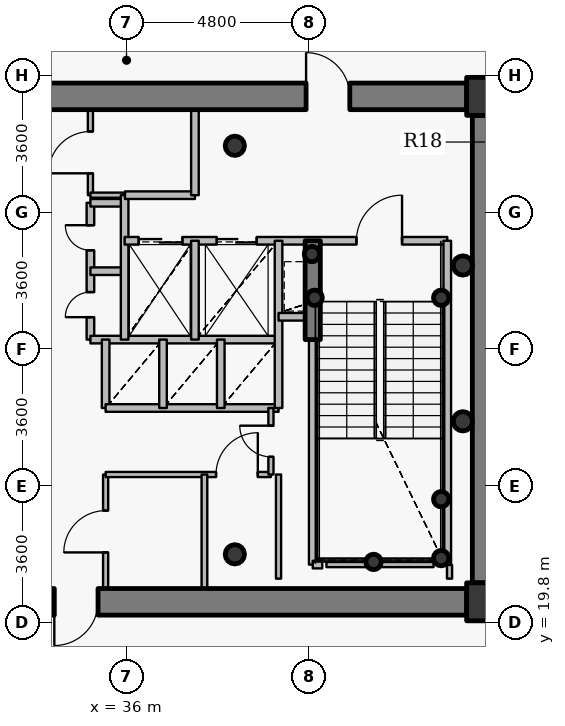
"""IFC4 building model, lengths in metres.
Left out: names, types, materials, properties, quantities, classifications, styles, units other than length and angle.
Written with IfcOpenShell. Run it as: python <this file> out.ifc"""

import sys

from ifc_helpers import new_model, si_unit, direction, frame, frame_2d, origin, origin_2d, place, context, subcontext, project, spatial, rectangle, hollow_circle, extrude, source, transform, mapped, element, fill, save


model = new_model("IFC4")
c1 = context("Model", 3, precision=1e-05, world=origin(), true_north=direction((0.0, 1.0)))
c2 = subcontext(c1, "Body", "Model", "MODEL_VIEW")
j1 = project(units=[si_unit("LENGTHUNIT", "METRE"), si_unit("PLANEANGLEUNIT", "RADIAN")], contexts=[c1])
p1 = place(None, origin())
s1 = spatial("IfcSite", under=j1, at=p1, CompositionType="ELEMENT")
p2 = place(p1, origin())
s2 = spatial("IfcBuilding", under=s1, at=p2, CompositionType="ELEMENT")
p3 = place(p2, frame((0.0, 0.0, 259.05)))
s3 = spatial("IfcBuildingStorey", under=s2, at=p3, CompositionType="ELEMENT", Elevation=259.05)
for number, where, z_axis, x_axis in (
    (1, (45.45, 20.35, 0.0), (0.0, 0.0, 1.0), (1.0, 0.0, 0.0)),
    (2, (45.45, 33.65, 0.0), (0.0, 0.0, 1.0), (1.0, 0.0, 0.0)),
):
    element("IfcColumn", number, at=place(p3, frame(where, z_axis=z_axis, x_axis=x_axis)), inside=s3, PredefinedType="COLUMN", context=c2, shape_type="SweptSolid", body=[
        extrude(rectangle(XDim=1.0, YDim=1.0, at=origin_2d()), origin(), (0.0, 0.0, 1.0), 3.75),
    ])
for number, where, z_axis, x_axis in (
    (3, (38.85, 21.6, 0.0), (0.0, 0.0, 1.0), (1.0, 0.0, 0.0)),
    (4, (38.85, 32.35, 0.0), (0.0, 0.0, 1.0), (1.0, 0.0, 0.0)),
):
    element("IfcColumn", number, at=place(p3, frame(where, z_axis=z_axis, x_axis=x_axis)), inside=s3, PredefinedType="COLUMN", context=c2, shape_type="SweptSolid", body=[
        extrude(hollow_circle(Radius=0.254, WallThickness=0.02, at=origin_2d()), origin(), (0.0, 0.0, 1.0), 3.75),
    ])
for number, where, z_axis, x_axis in (
    (5, (44.28, 21.5, 0.0), (0.0, 0.0, 1.0), (1.0, 0.0, 0.0)),
    (6, (44.28, 23.05, 0.0), (0.0, 0.0, 1.0), (1.0, 0.0, 0.0)),
    (7, (42.5, 21.4, 0.0), (0.0, 0.0, 1.0), (1.0, 0.0, 0.0)),
    (8, (40.95, 28.35, 0.0), (0.0, 0.0, 1.0), (1.0, 0.0, 0.0)),
    (9, (44.28, 28.35, 0.0), (0.0, 0.0, 1.0), (1.0, 0.0, 0.0)),
    (10, (40.88, 29.5, 0.0), (0.0, 0.0, 1.0), (1.0, 0.0, 0.0)),
):
    element("IfcColumn", number, at=place(p3, frame(where, z_axis=z_axis, x_axis=x_axis)), inside=s3, PredefinedType="COLUMN", context=c2, shape_type="SweptSolid", body=[
        extrude(hollow_circle(Radius=0.203, WallThickness=0.016, at=origin_2d()), origin(), (0.0, 0.0, 1.0), 3.75),
    ])
p4 = place(p3, frame((27.05, 33.65, 0.0), z_axis=(0.0, 0.0, 1.0), x_axis=(1.0, 0.0, 0.0)))
e11 = element("IfcWall", 11, at=p4, inside=s3, PredefinedType="SHEAR", context=c2, shape_type="SweptSolid", body=[
    extrude(rectangle(XDim=17.9, YDim=0.7, at=frame_2d((8.95, 0.0))), origin(), (0.0, 0.0, 1.0), 3.0),
])
p5 = place(p4, frame((13.675, 0.0, 0.0)))
e12 = element("IfcOpeningElement", 12, at=p5, cuts=e11, PredefinedType="OPENING", context=c2, shape_type="SweptSolid", body=[
    extrude(rectangle(XDim=1.15, YDim=2.15, at=origin_2d()), frame((0.575, 0.36, 1.075), z_axis=(0.0, -1.0, 0.0), x_axis=(1.0, 0.0, 0.0)), (0.0, 0.0, 1.0), 0.72),
])
p6 = place(p3, frame((45.45, 33.15, 0.0), z_axis=(0.0, 0.0, 1.0), x_axis=(0.0, -1.0, 0.0)))
e13 = element("IfcWall", 13, at=p6, inside=s3, PredefinedType="SHEAR", context=c2, shape_type="SweptSolid", body=[
    extrude(rectangle(XDim=12.3, YDim=0.7, at=frame_2d((6.15, 0.0))), origin(), (0.0, 0.0, 1.0), 3.0),
])
p7 = place(p3, frame((44.95, 20.35, 0.0), z_axis=(0.0, 0.0, 1.0), x_axis=(-1.0, 0.0, 0.0)))
e14 = element("IfcWall", 14, at=p7, inside=s3, PredefinedType="SHEAR", context=c2, shape_type="SweptSolid", body=[
    extrude(rectangle(XDim=17.9, YDim=0.7, at=frame_2d((8.95, 0.0))), origin(), (0.0, 0.0, 1.0), 3.0),
])
p8 = place(p7, frame((9.7, 0.0, 0.0)))
e15 = element("IfcOpeningElement", 15, at=p8, cuts=e14, PredefinedType="OPENING", context=c2, shape_type="SweptSolid", body=[
    extrude(rectangle(XDim=1.15, YDim=2.15, at=origin_2d()), frame((0.575, 0.36, 1.075), z_axis=(0.0, -1.0, 0.0), x_axis=(1.0, 0.0, 0.0)), (0.0, 0.0, 1.0), 0.72),
])
p9 = place(p3, frame((40.9, 27.25, 0.0), z_axis=(0.0, 0.0, 1.0), x_axis=(0.0, 1.0, 0.0)))
e16 = element("IfcWall", 16, at=p9, inside=s3, PredefinedType="SHEAR", context=c2, shape_type="SweptSolid", body=[
    extrude(rectangle(XDim=2.6, YDim=0.4, at=frame_2d((1.3, 0.0))), origin(), (0.0, 0.0, 1.0), 3.05),
])
for number, where, z_axis, x_axis in (
    (17, (44.85, 25.1, 0.0), (0.0, 0.0, 1.0), (1.0, 0.0, 0.0)),
    (18, (44.85, 29.2, 0.0), (0.0, 0.0, 1.0), (1.0, 0.0, 0.0)),
):
    element("IfcColumn", number, at=place(p3, frame(where, z_axis=z_axis, x_axis=x_axis)), inside=s3, PredefinedType="COLUMN", context=c2, shape_type="SweptSolid", body=[
        extrude(hollow_circle(Radius=0.254, WallThickness=0.02, at=origin_2d()), origin(), (0.0, 0.0, 1.0), 3.75),
    ])
p10 = place(p3, frame((35.05, 27.25, 0.0), z_axis=(0.0, 0.0, 1.0), x_axis=(0.0, 1.0, 0.0)))
e19 = element("IfcWall", 19, at=p10, inside=s3, PredefinedType="PARTITIONING", context=c2, shape_type="SweptSolid", body=[
    extrude(rectangle(XDim=3.6, YDim=0.2, at=frame_2d((1.8, 0.0))), origin(), (0.0, 0.0, 1.0), 3.45),
])
p11 = place(p10, frame((0.59, 0.0, 0.0)))
e20 = element("IfcOpeningElement", 20, at=p11, cuts=e19, PredefinedType="OPENING", context=c2, shape_type="SweptSolid", body=[
    extrude(rectangle(XDim=0.66, YDim=2.05, at=origin_2d()), frame((0.33, 0.11, 1.025), z_axis=(0.0, -1.0, 0.0), x_axis=(1.0, 0.0, 0.0)), (0.0, 0.0, 1.0), 0.22),
])
p12 = place(p10, frame((2.35, 0.0, 0.0)))
e21 = element("IfcOpeningElement", 21, at=p12, cuts=e19, PredefinedType="OPENING", context=c2, shape_type="SweptSolid", body=[
    extrude(rectangle(XDim=0.66, YDim=2.05, at=origin_2d()), frame((0.33, 0.11, 1.025), z_axis=(0.0, -1.0, 0.0), x_axis=(1.0, 0.0, 0.0)), (0.0, 0.0, 1.0), 0.22),
])
p13 = place(p3, frame((35.05, 27.25, 0.0), z_axis=(0.0, 0.0, 1.0), x_axis=(1.0, 0.0, 0.0)))
e22 = element("IfcWall", 22, at=p13, inside=s3, PredefinedType="PARTITIONING", context=c2, shape_type="SweptSolid", body=[
    extrude(rectangle(XDim=4.95, YDim=0.2, at=frame_2d((2.475, 0.0))), origin(), (0.0, 0.0, 1.0), 3.035),
])
for number, where, z_axis, x_axis in (
    (23, (35.05, 29.05, 0.0), (0.0, 0.0, 1.0), (1.0, 0.0, 0.0)),
    (24, (35.05, 30.85, 0.0), (0.0, 0.0, 1.0), (1.0, 0.0, 0.0)),
):
    element("IfcWall", number, at=place(p3, frame(where, z_axis=z_axis, x_axis=x_axis)), inside=s3, PredefinedType="PARTITIONING", context=c2, shape_type="SweptSolid", body=[
        extrude(rectangle(XDim=0.9, YDim=0.2, at=frame_2d((0.45, 0.0))), origin(), (0.0, 0.0, 1.0), 3.45),
    ])
p14 = place(p3, frame((35.05, 31.05, 0.0), z_axis=(0.0, 0.0, 1.0), x_axis=(0.0, 1.0, 0.0)))
e25 = element("IfcWall", 25, at=p14, inside=s3, PredefinedType="PARTITIONING", context=c2, shape_type="SweptSolid", body=[
    extrude(rectangle(XDim=2.25, YDim=0.135, at=frame_2d((1.125, 0.0))), origin(), (0.0, 0.0, 1.0), 3.035),
])
p15 = place(p14, frame((0.575, 0.0, 0.0)))
e26 = element("IfcOpeningElement", 26, at=p15, cuts=e25, PredefinedType="OPENING", context=c2, shape_type="SweptSolid", body=[
    extrude(rectangle(XDim=1.1, YDim=2.15, at=origin_2d()), frame((0.55, 0.078, 1.075), z_axis=(0.0, -1.0, 0.0), x_axis=(1.0, 0.0, 0.0)), (0.0, 0.0, 1.0), 0.155),
])
p16 = place(p3, frame((35.05, 31.05, 0.0), z_axis=(0.0, 0.0, 1.0), x_axis=(1.0, 0.0, 0.0)))
e27 = element("IfcWall", 27, at=p16, inside=s3, PredefinedType="PARTITIONING", context=c2, shape_type="SweptSolid", body=[
    extrude(rectangle(XDim=0.9, YDim=0.135, at=frame_2d((0.45, 0.0))), origin(), (0.0, 0.0, 1.0), 3.45),
])
p17 = place(p3, frame((35.45, 20.7, 0.0), z_axis=(0.0, 0.0, 1.0), x_axis=(0.0, 1.0, 0.0)))
e28 = element("IfcWall", 28, at=p17, inside=s3, PredefinedType="PARTITIONING", context=c2, shape_type="SweptSolid", body=[
    extrude(rectangle(XDim=3.0, YDim=0.135, at=frame_2d((1.5, 0.0))), origin(), (0.0, 0.0, 1.0), 3.035),
])
p18 = place(p17, frame((0.95, 0.0, 0.0)))
e29 = element("IfcOpeningElement", 29, at=p18, cuts=e28, PredefinedType="OPENING", context=c2, shape_type="SweptSolid", body=[
    extrude(rectangle(XDim=1.1, YDim=2.15, at=origin_2d()), frame((0.55, 0.078, 1.075), z_axis=(0.0, -1.0, 0.0), x_axis=(1.0, 0.0, 0.0)), (0.0, 0.0, 1.0), 0.155),
])
p19 = place(p3, frame((35.45, 23.7, 0.0), z_axis=(0.0, 0.0, 1.0), x_axis=(1.0, 0.0, 0.0)))
e30 = element("IfcWall", 30, at=p19, inside=s3, PredefinedType="PARTITIONING", context=c2, shape_type="SweptSolid", body=[
    extrude(rectangle(XDim=4.35, YDim=0.135, at=frame_2d((2.175, 0.0))), origin(), (0.0, 0.0, 1.0), 3.035),
])
p20 = place(p19, frame((2.905, 0.0, 0.0)))
e31 = element("IfcOpeningElement", 31, at=p20, cuts=e30, PredefinedType="OPENING", context=c2, shape_type="SweptSolid", body=[
    extrude(rectangle(XDim=1.1, YDim=2.15, at=origin_2d()), frame((0.55, 0.078, 1.075), z_axis=(0.0, -1.0, 0.0), x_axis=(1.0, 0.0, 0.0)), (0.0, 0.0, 1.0), 0.155),
])
p21 = place(p3, frame((35.45, 25.45, 0.0), z_axis=(0.0, 0.0, 1.0), x_axis=(0.0, 1.0, 0.0)))
e32 = element("IfcWall", 32, at=p21, inside=s3, PredefinedType="PARTITIONING", context=c2, shape_type="SweptSolid", body=[
    extrude(rectangle(XDim=1.8, YDim=0.2, at=frame_2d((0.9, 0.0))), origin(), (0.0, 0.0, 1.0), 3.45),
])
p22 = place(p3, frame((35.45, 25.45, 0.0), z_axis=(0.0, 0.0, 1.0), x_axis=(1.0, 0.0, 0.0)))
e33 = element("IfcWall", 33, at=p22, inside=s3, PredefinedType="PARTITIONING", context=c2, shape_type="SweptSolid", body=[
    extrude(rectangle(XDim=4.55, YDim=0.2, at=frame_2d((2.275, 0.0))), origin(), (0.0, 0.0, 1.0), 3.035),
])
p23 = place(p3, frame((35.95, 27.25, 0.0), z_axis=(0.0, 0.0, 1.0), x_axis=(0.0, 1.0, 0.0)))
e34 = element("IfcWall", 34, at=p23, inside=s3, PredefinedType="PARTITIONING", context=c2, shape_type="SweptSolid", body=[
    extrude(rectangle(XDim=3.8, YDim=0.2, at=frame_2d((1.9, 0.0))), origin(), (0.0, 0.0, 1.0), 3.45),
])
p24 = place(p3, frame((35.95, 29.85, 0.0), z_axis=(0.0, 0.0, 1.0), x_axis=(1.0, 0.0, 0.0)))
e35 = element("IfcWall", 35, at=p24, inside=s3, PredefinedType="PARTITIONING", context=c2, shape_type="SweptSolid", body=[
    extrude(rectangle(XDim=8.49, YDim=0.2, at=frame_2d((4.245, 0.0))), origin(), (0.0, 0.0, 1.0), 3.035),
])
p25 = place(p24, frame((6.1, 0.0, 0.0)))
e36 = element("IfcOpeningElement", 36, at=p25, cuts=e35, PredefinedType="OPENING", context=c2, shape_type="SweptSolid", body=[
    extrude(rectangle(XDim=1.2, YDim=2.15, at=origin_2d()), frame((0.6, 0.11, 1.075), z_axis=(0.0, -1.0, 0.0), x_axis=(1.0, 0.0, 0.0)), (0.0, 0.0, 1.0), 0.22),
])
p26 = place(p24, frame((0.37, 0.0, 0.0)))
e37 = element("IfcOpeningElement", 37, at=p26, cuts=e35, PredefinedType="OPENING", context=c2, shape_type="SweptSolid", body=[
    extrude(rectangle(XDim=1.15, YDim=2.15, at=origin_2d()), frame((0.575, 0.11, 1.075), z_axis=(0.0, -1.0, 0.0), x_axis=(1.0, 0.0, 0.0)), (0.0, 0.0, 1.0), 0.22),
])
p27 = place(p24, frame((2.425, 0.0, 0.0)))
e38 = element("IfcOpeningElement", 38, at=p27, cuts=e35, PredefinedType="OPENING", context=c2, shape_type="SweptSolid", body=[
    extrude(rectangle(XDim=1.05, YDim=2.15, at=origin_2d()), frame((0.525, 0.11, 1.075), z_axis=(0.0, -1.0, 0.0), x_axis=(1.0, 0.0, 0.0)), (0.0, 0.0, 1.0), 0.22),
])
p28 = place(p3, frame((35.96, 31.05, 0.0), z_axis=(0.0, 0.0, 1.0), x_axis=(1.0, 0.0, 0.0)))
e39 = element("IfcWall", 39, at=p28, inside=s3, PredefinedType="PARTITIONING", context=c2, shape_type="SweptSolid", body=[
    extrude(rectangle(XDim=1.84, YDim=0.2, at=frame_2d((0.92, 0.0))), origin(), (0.0, 0.0, 1.0), 3.45),
])
p29 = place(p3, frame((36.96, 25.45, 0.0), z_axis=(0.0, 0.0, 1.0), x_axis=(0.0, 1.0, 0.0)))
e40 = element("IfcWall", 40, at=p29, inside=s3, PredefinedType="PARTITIONING", context=c2, shape_type="SweptSolid", body=[
    extrude(rectangle(XDim=1.8, YDim=0.2, at=frame_2d((0.9, 0.0))), origin(), (0.0, 0.0, 1.0), 3.45),
])
p30 = place(p3, frame((37.8, 27.25, 0.0), z_axis=(0.0, 0.0, 1.0), x_axis=(0.0, 1.0, 0.0)))
e41 = element("IfcWall", 41, at=p30, inside=s3, PredefinedType="PARTITIONING", context=c2, shape_type="SweptSolid", body=[
    extrude(rectangle(XDim=2.6, YDim=0.2, at=frame_2d((1.3, 0.0))), origin(), (0.0, 0.0, 1.0), 3.45),
])
p31 = place(p3, frame((37.8, 31.05, 0.0), z_axis=(0.0, 0.0, 1.0), x_axis=(0.0, 1.0, 0.0)))
e42 = element("IfcWall", 42, at=p31, inside=s3, PredefinedType="PARTITIONING", context=c2, shape_type="SweptSolid", body=[
    extrude(rectangle(XDim=2.25, YDim=0.2, at=frame_2d((1.125, 0.0))), origin(), (0.0, 0.0, 1.0), 3.035),
])
p32 = place(p3, frame((38.05, 20.18, 0.0), z_axis=(0.0, 0.0, 1.0), x_axis=(0.0, 1.0, 0.0)))
e43 = element("IfcWall", 43, at=p32, inside=s3, PredefinedType="PARTITIONING", context=c2, shape_type="SweptSolid", body=[
    extrude(rectangle(XDim=3.52, YDim=0.15, at=frame_2d((1.76, 0.0))), origin(), (0.0, 0.0, 1.0), 2.985),
])
p33 = place(p3, frame((38.48, 25.45, 0.0), z_axis=(0.0, 0.0, 1.0), x_axis=(0.0, 1.0, 0.0)))
e44 = element("IfcWall", 44, at=p33, inside=s3, PredefinedType="PARTITIONING", context=c2, shape_type="SweptSolid", body=[
    extrude(rectangle(XDim=1.8, YDim=0.2, at=frame_2d((0.9, 0.0))), origin(), (0.0, 0.0, 1.0), 3.45),
])
p34 = place(p3, frame((39.8, 23.7, 0.0), z_axis=(0.0, 0.0, 1.0), x_axis=(0.0, 1.0, 0.0)))
e45 = element("IfcWall", 45, at=p34, inside=s3, PredefinedType="PARTITIONING", context=c2, shape_type="SweptSolid", body=[
    extrude(rectangle(XDim=1.75, YDim=0.135, at=frame_2d((0.875, 0.0))), origin(), (0.0, 0.0, 1.0), 3.45),
])
p35 = place(p34, frame((0.465, 0.0, 0.0)))
e46 = element("IfcOpeningElement", 46, at=p35, cuts=e45, PredefinedType="OPENING", context=c2, shape_type="SweptSolid", body=[
    extrude(rectangle(XDim=0.82, YDim=2.1, at=origin_2d()), frame((0.41, 0.078, 1.05), z_axis=(0.0, -1.0, 0.0), x_axis=(1.0, 0.0, 0.0)), (0.0, 0.0, 1.0), 0.155),
])
p36 = place(p3, frame((40.0, 25.45, 0.0), z_axis=(0.0, 0.0, 1.0), x_axis=(0.0, 1.0, 0.0)))
e47 = element("IfcWall", 47, at=p36, inside=s3, PredefinedType="PARTITIONING", context=c2, shape_type="SweptSolid", body=[
    extrude(rectangle(XDim=4.4, YDim=0.2, at=frame_2d((2.2, 0.0))), origin(), (0.0, 0.0, 1.0), 3.45),
])
p37 = place(p3, frame((40.0, 27.85, 0.0), z_axis=(0.0, 0.0, 1.0), x_axis=(1.0, 0.0, 0.0)))
e48 = element("IfcWall", 48, at=p37, inside=s3, PredefinedType="PARTITIONING", context=c2, shape_type="SweptSolid", body=[
    extrude(rectangle(XDim=0.9, YDim=0.2, at=frame_2d((0.45, 0.0))), origin(), (0.0, 0.0, 1.0), 3.45),
])
p38 = place(p3, frame((40.9, 21.33, 0.0), z_axis=(0.0, 0.0, 1.0), x_axis=(0.0, 1.0, 0.0)))
e49 = element("IfcWall", 49, at=p38, inside=s3, PredefinedType="PARTITIONING", context=c2, shape_type="SweptSolid", body=[
    extrude(rectangle(XDim=5.91, YDim=0.2, at=frame_2d((2.955, 0.0))), origin(), (0.0, 0.0, 1.0), 2.985),
])
p39 = place(p3, frame((40.9, 21.33, 0.0), z_axis=(0.0, 0.0, 1.0), x_axis=(1.0, 0.0, 0.0)))
e50 = element("IfcWall", 50, at=p39, inside=s3, PredefinedType="PARTITIONING", context=c2, shape_type="SweptSolid", body=[
    extrude(rectangle(XDim=0.25, YDim=0.2, at=frame_2d((0.125, 0.0))), origin(), (0.0, 0.0, 1.0), 2.985),
])
p40 = place(p3, frame((44.44, 21.33, 0.0), z_axis=(0.0, 0.0, 1.0), x_axis=(0.0, 1.0, 0.0)))
e51 = element("IfcWall", 51, at=p40, inside=s3, PredefinedType="PARTITIONING", context=c2, shape_type="SweptSolid", body=[
    extrude(rectangle(XDim=8.52, YDim=0.2, at=frame_2d((4.26, 0.0))), origin(), (0.0, 0.0, 1.0), 3.45),
])
p41 = place(p3, frame((44.08, 21.33, 0.0), z_axis=(0.0, 0.0, 1.0), x_axis=(-1.0, 0.0, 0.0)))
e52 = element("IfcWall", 52, at=p41, inside=s3, PredefinedType="PARTITIONING", context=c2, shape_type="SweptSolid", body=[
    extrude(rectangle(XDim=2.82, YDim=0.135, at=frame_2d((1.41, 0.0))), origin(), (0.0, 0.0, 1.0), 2.985),
])
p42 = place(p3, frame((40.0, 23.7, 0.0), z_axis=(0.0, 0.0, 1.0), x_axis=(0.0, -1.0, 0.0)))
e53 = element("IfcWall", 53, at=p42, inside=s3, PredefinedType="PARTITIONING", context=c2, shape_type="SweptSolid", body=[
    extrude(rectangle(XDim=2.74, YDim=0.135, at=frame_2d((1.37, 0.0))), origin(), (0.0, 0.0, 1.0), 2.985),
])
p43 = place(p3, frame((44.5, 20.96, 0.0), z_axis=(0.0, 0.0, 1.0), x_axis=(0.0, 1.0, 0.0)))
e54 = element("IfcWall", 54, at=p43, inside=s3, PredefinedType="PARTITIONING", context=c2, shape_type="SweptSolid", body=[
    extrude(rectangle(XDim=0.36, YDim=0.135, at=frame_2d((0.18, 0.0))), origin(), (0.0, 0.0, 1.0), 3.45),
])
for number, where, z_axis, x_axis in (
    (55, (45.79, 34.0, 0.0), (0.0, 0.0, 1.0), (-1.0, 0.0, 0.0)),
    (56, (44.96, 20.0, 0.0), (0.0, 0.0, 1.0), (1.0, 0.0, 0.0)),
):
    element("IfcWall", number, at=place(p3, frame(where, z_axis=z_axis, x_axis=x_axis)), inside=s3, PredefinedType="PARTITIONING", context=c2, shape_type="SweptSolid", body=[
        extrude(rectangle(XDim=0.83, YDim=0.135, at=frame_2d((0.415, 0.0))), origin(), (0.0, 0.0, 1.0), 2.885),
    ])
m1 = source(origin(), c2, "Body", "SweptSolid", [
    extrude(rectangle(XDim=1.15, YDim=2.15, at=origin_2d()), frame((0.575, 0.025, 1.075), z_axis=(0.0, -1.0, 0.0), x_axis=(1.0, 0.0, 0.0)), (0.0, 0.0, 1.0), 0.05),
])
p44 = place(p5, origin())
e57 = element("IfcDoor", 57, at=p44, inside=s3, OperationType="SINGLE_SWING_LEFT", PredefinedType="DOOR", context=c2, shape_type="MappedRepresentation", body=[
    mapped(m1, transform((0.0, 0.0, 0.0), x_axis=(1.0, 0.0, 0.0), y_axis=(0.0, 1.0, 0.0), z_axis=(0.0, 0.0, 1.0), scale=1.0)),
])
fill(e12, e57)
p45 = place(p8, origin())
e58 = element("IfcDoor", 58, at=p45, inside=s3, OperationType="SINGLE_SWING_RIGHT", PredefinedType="DOOR", context=c2, shape_type="MappedRepresentation", body=[
    mapped(m1, transform((0.0, 0.0, 0.0), x_axis=(1.0, 0.0, 0.0), y_axis=(0.0, 1.0, 0.0), z_axis=(0.0, 0.0, 1.0), scale=1.0)),
])
fill(e15, e58)
m2 = source(origin(), c2, "Body", "SweptSolid", [
    extrude(rectangle(XDim=1.2, YDim=2.15, at=origin_2d()), frame((0.6, 0.025, 1.075), z_axis=(0.0, -1.0, 0.0), x_axis=(1.0, 0.0, 0.0)), (0.0, 0.0, 1.0), 0.05),
])
p46 = place(p25, origin())
e59 = element("IfcDoor", 59, at=p46, inside=s3, OperationType="SINGLE_SWING_RIGHT", PredefinedType="DOOR", context=c2, shape_type="MappedRepresentation", body=[
    mapped(m2, transform((0.0, 0.0, 0.0), x_axis=(1.0, 0.0, 0.0), y_axis=(0.0, 1.0, 0.0), z_axis=(0.0, 0.0, 1.0), scale=1.0)),
])
fill(e36, e59)
m3 = source(origin(), c2, "Body", "SweptSolid", [
    extrude(rectangle(XDim=1.15, YDim=2.15, at=origin_2d()), frame((0.575, 0.025, 1.075), z_axis=(0.0, -1.0, 0.0), x_axis=(1.0, 0.0, 0.0)), (0.0, 0.0, 1.0), 0.05),
])
p47 = place(p26, origin())
e60 = element("IfcDoor", 60, at=p47, inside=s3, OperationType="DOUBLE_DOOR_SLIDING", PredefinedType="USERDEFINED", context=c2, shape_type="MappedRepresentation", body=[
    mapped(m3, transform((0.0, 0.0, 0.0), x_axis=(1.0, 0.0, 0.0), y_axis=(0.0, 1.0, 0.0), z_axis=(0.0, 0.0, 1.0), scale=1.0)),
])
fill(e37, e60)
m4 = source(origin(), c2, "Body", "SweptSolid", [
    extrude(rectangle(XDim=1.05, YDim=2.15, at=origin_2d()), frame((0.525, 0.025, 1.075), z_axis=(0.0, -1.0, 0.0), x_axis=(1.0, 0.0, 0.0)), (0.0, 0.0, 1.0), 0.05),
])
p48 = place(p27, origin())
e61 = element("IfcDoor", 61, at=p48, inside=s3, OperationType="DOUBLE_DOOR_SLIDING", PredefinedType="USERDEFINED", context=c2, shape_type="MappedRepresentation", body=[
    mapped(m4, transform((0.0, 0.0, 0.0), x_axis=(1.0, 0.0, 0.0), y_axis=(0.0, 1.0, 0.0), z_axis=(0.0, 0.0, 1.0), scale=1.0)),
])
fill(e38, e61)
m5 = source(origin(), c2, "Body", "SweptSolid", [
    extrude(rectangle(XDim=0.66, YDim=2.05, at=origin_2d()), frame((0.33, 0.025, 1.025), z_axis=(0.0, -1.0, 0.0), x_axis=(1.0, 0.0, 0.0)), (0.0, 0.0, 1.0), 0.05),
])
p49 = place(p11, origin())
e62 = element("IfcDoor", 62, at=p49, inside=s3, OperationType="SINGLE_SWING_LEFT", PredefinedType="USERDEFINED", context=c2, shape_type="MappedRepresentation", body=[
    mapped(m5, transform((0.0, 0.0, 0.0), x_axis=(1.0, 0.0, 0.0), y_axis=(0.0, 1.0, 0.0), z_axis=(0.0, 0.0, 1.0), scale=1.0)),
])
fill(e20, e62)
p50 = place(p12, origin())
e63 = element("IfcDoor", 63, at=p50, inside=s3, OperationType="SINGLE_SWING_RIGHT", PredefinedType="USERDEFINED", context=c2, shape_type="MappedRepresentation", body=[
    mapped(m5, transform((0.0, 0.0, 0.0), x_axis=(1.0, 0.0, 0.0), y_axis=(0.0, 1.0, 0.0), z_axis=(0.0, 0.0, 1.0), scale=1.0)),
])
fill(e21, e63)
m6 = source(origin(), c2, "Body", "SweptSolid", [
    extrude(rectangle(XDim=1.1, YDim=2.15, at=origin_2d()), frame((0.55, 0.025, 1.075), z_axis=(0.0, -1.0, 0.0), x_axis=(1.0, 0.0, 0.0)), (0.0, 0.0, 1.0), 0.05),
])
p51 = place(p18, origin())
e64 = element("IfcDoor", 64, at=p51, inside=s3, OperationType="SINGLE_SWING_LEFT", PredefinedType="DOOR", context=c2, shape_type="MappedRepresentation", body=[
    mapped(m6, transform((0.0, 0.0, 0.0), x_axis=(1.0, 0.0, 0.0), y_axis=(0.0, 1.0, 0.0), z_axis=(0.0, 0.0, 1.0), scale=1.0)),
])
fill(e29, e64)
p52 = place(p20, origin())
e65 = element("IfcDoor", 65, at=p52, inside=s3, OperationType="SINGLE_SWING_RIGHT", PredefinedType="DOOR", context=c2, shape_type="MappedRepresentation", body=[
    mapped(m6, transform((0.0, 0.0, 0.0), x_axis=(1.0, 0.0, 0.0), y_axis=(0.0, 1.0, 0.0), z_axis=(0.0, 0.0, 1.0), scale=1.0)),
])
fill(e31, e65)
p53 = place(p15, origin())
e66 = element("IfcDoor", 66, at=p53, inside=s3, OperationType="SINGLE_SWING_LEFT", PredefinedType="DOOR", context=c2, shape_type="MappedRepresentation", body=[
    mapped(m6, transform((0.0, 0.0, 0.0), x_axis=(1.0, 0.0, 0.0), y_axis=(0.0, 1.0, 0.0), z_axis=(0.0, 0.0, 1.0), scale=1.0)),
])
fill(e26, e66)
m7 = source(origin(), c2, "Body", "SweptSolid", [
    extrude(rectangle(XDim=0.82, YDim=2.1, at=origin_2d()), frame((0.41, 0.025, 1.05), z_axis=(0.0, -1.0, 0.0), x_axis=(1.0, 0.0, 0.0)), (0.0, 0.0, 1.0), 0.05),
])
p54 = place(p35, origin())
e67 = element("IfcDoor", 67, at=p54, inside=s3, OperationType="SINGLE_SWING_RIGHT", PredefinedType="DOOR", context=c2, shape_type="MappedRepresentation", body=[
    mapped(m7, transform((0.0, 0.0, 0.0), x_axis=(1.0, 0.0, 0.0), y_axis=(0.0, 1.0, 0.0), z_axis=(0.0, 0.0, 1.0), scale=1.0)),
])
fill(e46, e67)
save(model, sys.argv[1])
